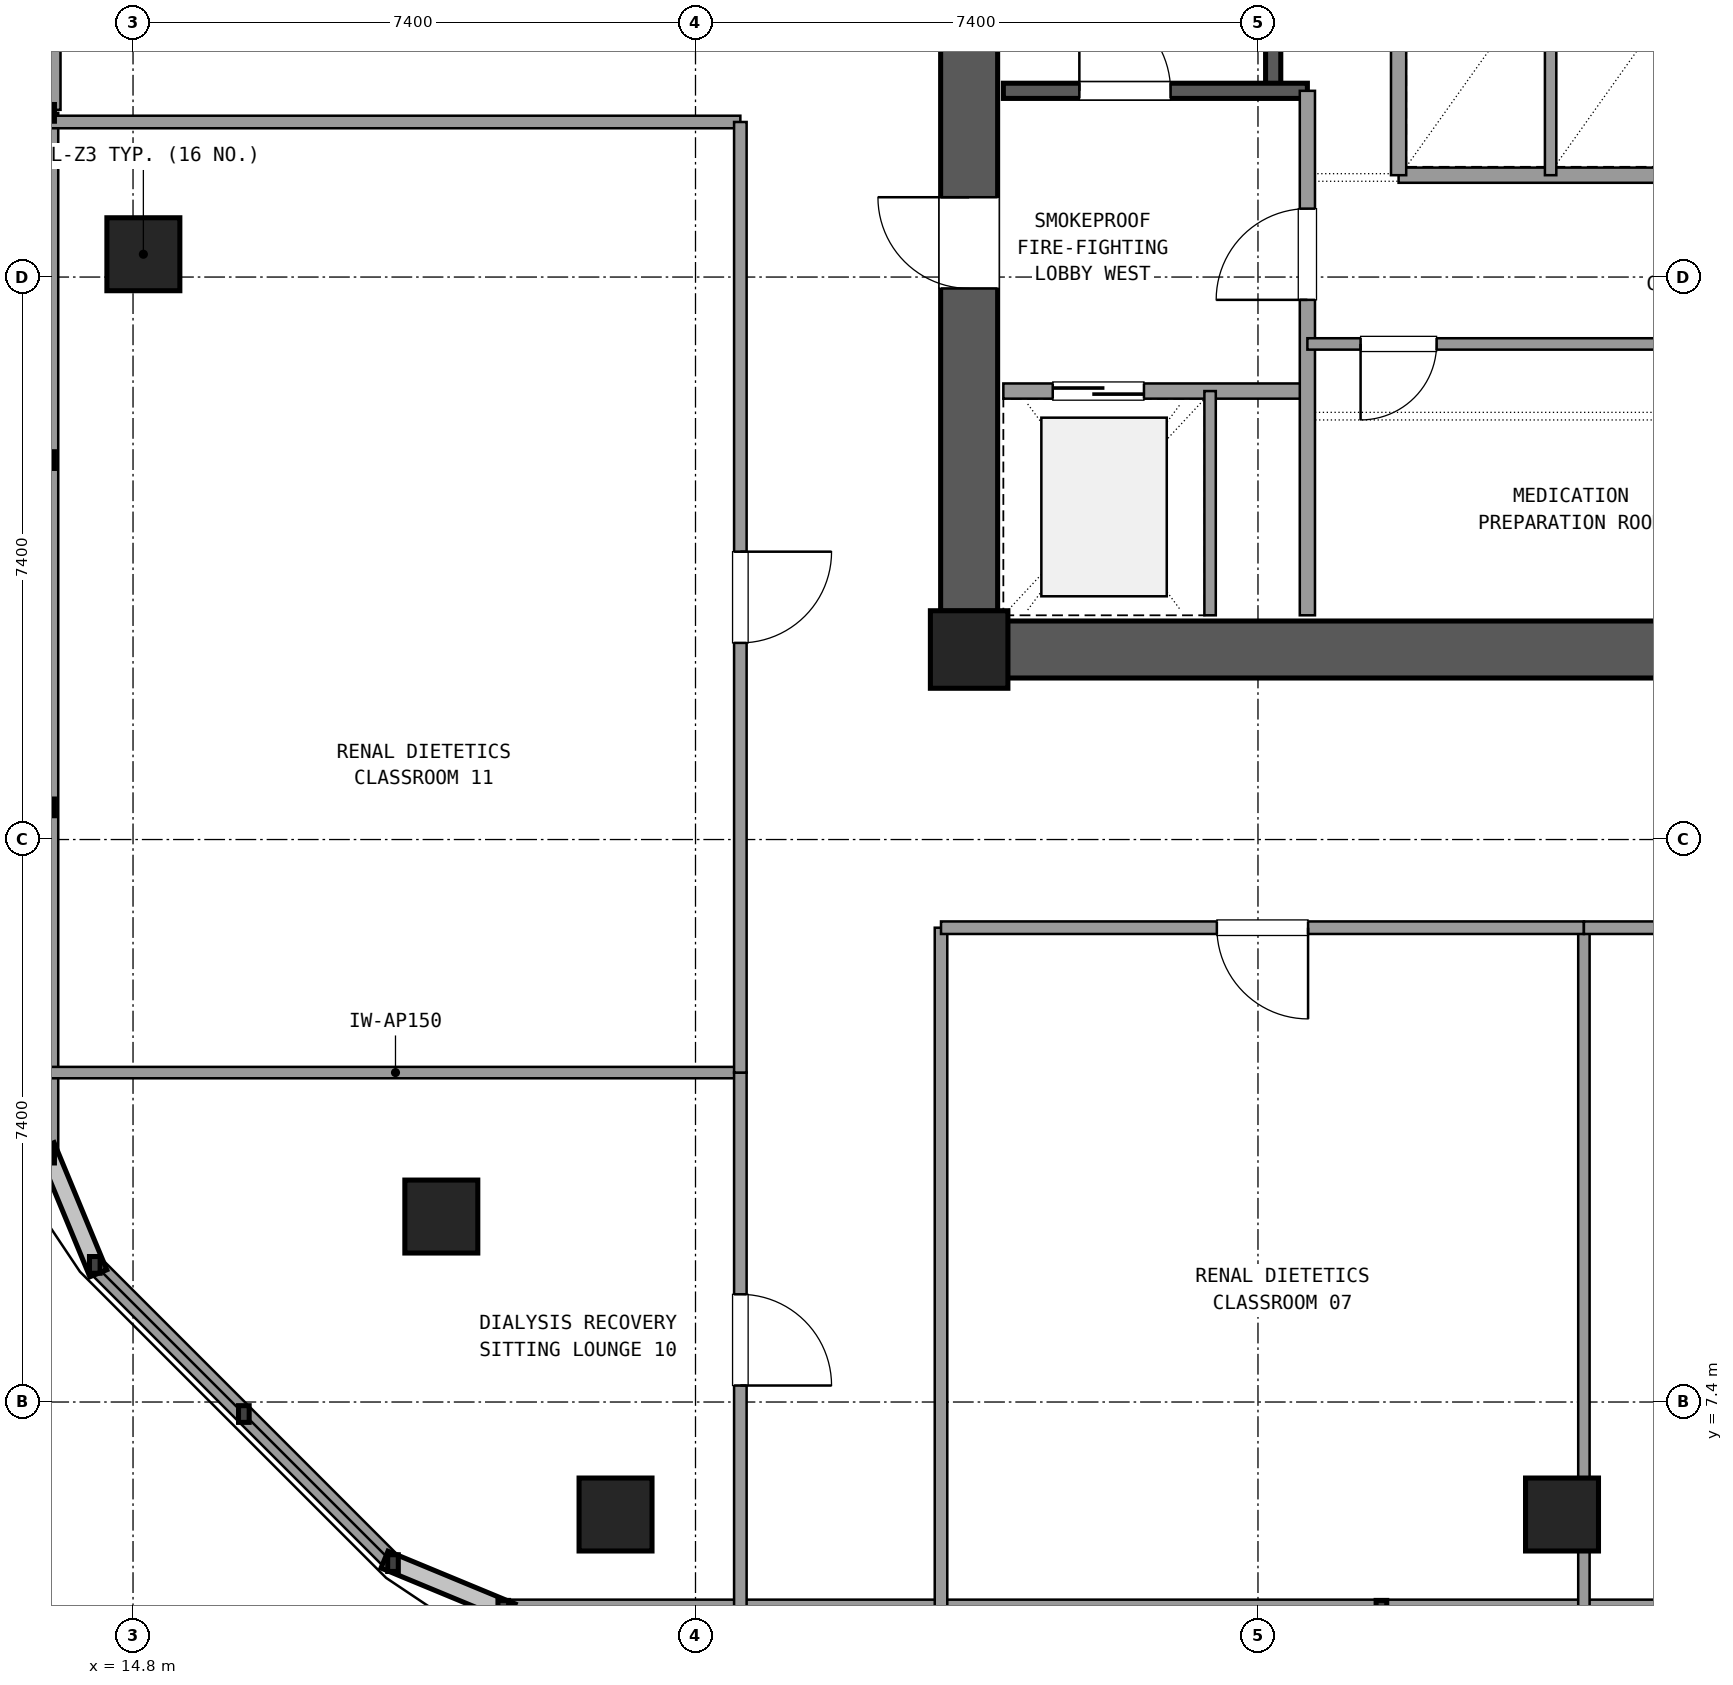
"""IFC4 building model, lengths in metres.
Left out: names, types, materials, properties, quantities, classifications, styles, units other than length and angle.
Written with IfcOpenShell. Run it as: python <this file> out.ifc"""

import sys

from ifc_helpers import new_model, si_unit, direction, frame, frame_2d, origin, origin_2d, place, context, subcontext, project, spatial, rectangle, extrude, element, fill, save


model = new_model("IFC4")
c1 = context("Model", 3, precision=1e-05, world=origin(), true_north=direction((0.0, 1.0)))
c2 = subcontext(c1, "Body", "Model", "MODEL_VIEW")
j1 = project(units=[si_unit("LENGTHUNIT", "METRE"), si_unit("PLANEANGLEUNIT", "RADIAN")], contexts=[c1])
p1 = place(None, origin())
s1 = spatial("IfcSite", under=j1, at=p1, CompositionType="ELEMENT")
p2 = place(p1, origin())
s2 = spatial("IfcBuilding", under=s1, at=p2, CompositionType="ELEMENT")
p3 = place(p2, frame((0.0, 0.0, 156.42)))
s3 = spatial("IfcBuildingStorey", under=s2, at=p3, CompositionType="ELEMENT", Elevation=156.42)
p4 = place(p3, frame((25.8, 17.3, 0.0), z_axis=(0.0, 0.0, 1.0), x_axis=(1.0, 0.0, 0.0)))
e1 = element("IfcColumn", 1, at=p4, inside=s3, PredefinedType="COLUMN", context=c2, shape_type="SweptSolid", body=[
    extrude(rectangle(XDim=1.02, YDim=1.02, at=origin_2d()), origin(), (0.0, 0.0, 1.0), 3.6),
])
p5 = place(p3, frame((26.305, 17.3, 0.0), z_axis=(0.0, 0.0, 1.0), x_axis=(1.0, 0.0, 0.0)))
e2 = element("IfcWall", 2, at=p5, inside=s3, PredefinedType="SHEAR", context=c2, shape_type="SweptSolid", body=[
    extrude(rectangle(XDim=10.19, YDim=0.75, at=frame_2d((5.095, 0.0))), origin(), (0.0, 0.0, 1.0), 3.32),
])
p6 = place(p3, frame((25.8, 25.395, 0.0), z_axis=(0.0, 0.0, 1.0), x_axis=(0.0, -1.0, 0.0)))
e3 = element("IfcWall", 3, at=p6, inside=s3, PredefinedType="SHEAR", context=c2, shape_type="SweptSolid", body=[
    extrude(rectangle(XDim=7.59, YDim=0.75, at=frame_2d((3.795, 0.0))), origin(), (0.0, 0.0, 1.0), 3.32),
])
p7 = place(p6, frame((2.145, 0.0, 0.0)))
e4 = element("IfcOpeningElement", 4, at=p7, cuts=e3, PredefinedType="OPENING", context=c2, shape_type="SweptSolid", body=[
    extrude(rectangle(XDim=1.2, YDim=2.15, at=frame_2d((0.6, 1.075))), frame((0.0, 0.385, 0.0), z_axis=(0.0, -1.0, 0.0), x_axis=(1.0, 0.0, 0.0)), (0.0, 0.0, 1.0), 0.77),
])
for number, where, z_axis, x_axis in (
    (5, (14.936, 22.5, 0.0), (0.0, 0.0, 1.0), (1.0, 0.0, 0.0)),
    (6, (18.856, 9.84, 0.0), (0.0, 0.0, 1.0), (1.0, 0.0, 0.0)),
    (7, (21.148, 5.92, 0.0), (0.0, 0.0, 1.0), (1.0, 0.0, 0.0)),
    (8, (33.6, 5.92, 0.0), (0.0, 0.0, 1.0), (1.0, 0.0, 0.0)),
):
    element("IfcColumn", number, at=place(p3, frame(where, z_axis=z_axis, x_axis=x_axis)), inside=s3, PredefinedType="COLUMN", context=c2, shape_type="SweptSolid", body=[
        extrude(rectangle(XDim=0.96, YDim=0.96, at=origin_2d()), origin(), (0.0, 0.0, 1.0), 3.6),
    ])
p8 = place(p3, frame((19.671, 4.68, 0.0), z_axis=(0.0, 0.0, 1.0), x_axis=(1.0, 0.0, 0.0)))
e9 = element("IfcWall", 9, at=p8, inside=s3, PredefinedType="SOLIDWALL", context=c2, shape_type="SweptSolid", body=[
    extrude(rectangle(XDim=34.658, YDim=0.24, at=frame_2d((17.329, 0.0))), origin(), (0.0, 0.0, 1.0), 0.85),
])
p9 = place(p3, frame((13.696, 27.4, 0.0), z_axis=(0.0, 0.0, 1.0), x_axis=(0.0, -1.0, 0.0)))
e10 = element("IfcWall", 10, at=p9, inside=s3, PredefinedType="SOLIDWALL", context=c2, shape_type="SweptSolid", body=[
    extrude(rectangle(XDim=3.0, YDim=0.3, at=frame_2d((1.5, 0.0))), origin(), (0.0, 0.0, 1.0), 2.67),
])
p10 = place(p9, frame((0.9, 0.0, 0.0)))
e11 = element("IfcOpeningElement", 11, at=p10, cuts=e10, PredefinedType="OPENING", context=c2, shape_type="SweptSolid", body=[
    extrude(rectangle(XDim=1.2, YDim=2.2, at=frame_2d((0.6, 1.1))), frame((0.0, 0.16, 0.0), z_axis=(0.0, -1.0, 0.0), x_axis=(1.0, 0.0, 0.0)), (0.0, 0.0, 1.0), 0.32),
])
p11 = place(p3, frame((13.696, 24.36, 0.0), z_axis=(0.0, 0.0, 1.0), x_axis=(0.0, -1.0, 0.0)))
e12 = element("IfcWall", 12, at=p11, inside=s3, PredefinedType="SOLIDWALL", context=c2, shape_type="SweptSolid", body=[
    extrude(rectangle(XDim=13.705, YDim=0.24, at=frame_2d((6.853, 0.0))), origin(), (0.0, 0.0, 1.0), 0.85),
])
p12 = place(p3, frame((14.297, 9.204, 0.0), z_axis=(0.0, 0.0, 1.0), x_axis=(0.707084777957, -0.707128783731, 0.0)))
e13 = element("IfcWall", 13, at=p12, inside=s3, PredefinedType="SOLIDWALL", context=c2, shape_type="SweptSolid", body=[
    extrude(rectangle(XDim=5.548, YDim=0.24, at=frame_2d((2.774, 0.0))), origin(), (0.0, 0.0, 1.0), 0.85),
])
p13 = place(p3, frame((29.8, 24.65, 0.0), z_axis=(0.0, 0.0, 1.0), x_axis=(0.0, 1.0, 0.0)))
e14 = element("IfcWall", 14, at=p13, inside=s3, PredefinedType="SHEAR", context=c2, shape_type="SweptSolid", body=[
    extrude(rectangle(XDim=9.4, YDim=0.2, at=frame_2d((4.7, 0.0))), origin(), (0.0, 0.0, 1.0), 3.32),
])
p14 = place(p3, frame((26.25, 24.65, 0.0), z_axis=(0.0, 0.0, 1.0), x_axis=(1.0, 0.0, 0.0)))
e15 = element("IfcWall", 15, at=p14, inside=s3, PredefinedType="SHEAR", context=c2, shape_type="SweptSolid", body=[
    extrude(rectangle(XDim=4.0, YDim=0.2, at=frame_2d((2.0, 0.0))), origin(), (0.0, 0.0, 1.0), 3.32),
])
p15 = place(p14, frame((1.0, 0.0, 0.0)))
e16 = element("IfcOpeningElement", 16, at=p15, cuts=e15, PredefinedType="OPENING", context=c2, shape_type="SweptSolid", body=[
    extrude(rectangle(XDim=1.2, YDim=2.15, at=frame_2d((0.6, 1.075))), frame((0.0, 0.11, 0.0), z_axis=(0.0, -1.0, 0.0), x_axis=(1.0, 0.0, 0.0)), (0.0, 0.0, 1.0), 0.22),
])
p16 = place(p3, frame((26.25, 20.7, 0.0), z_axis=(0.0, 0.0, 1.0), x_axis=(1.0, 0.0, 0.0)))
e17 = element("IfcWall", 17, at=p16, inside=s3, PredefinedType="SOLIDWALL", context=c2, shape_type="SweptSolid", body=[
    extrude(rectangle(XDim=4.0, YDim=0.2, at=frame_2d((2.0, 0.0))), origin(), (0.0, 0.0, 1.0), 2.61),
])
p17 = place(p16, frame((0.65, 0.0, 0.0)))
e18 = element("IfcOpeningElement", 18, at=p17, cuts=e17, PredefinedType="OPENING", context=c2, shape_type="SweptSolid", body=[
    extrude(rectangle(XDim=1.2, YDim=2.15, at=frame_2d((0.6, 1.075))), frame((0.0, 0.11, 0.0), z_axis=(0.0, -1.0, 0.0), x_axis=(1.0, 0.0, 0.0)), (0.0, 0.0, 1.0), 0.22),
])
p18 = place(p3, frame((30.25, 17.75, 0.0), z_axis=(0.0, 0.0, 1.0), x_axis=(0.0, 1.0, 0.0)))
e19 = element("IfcWall", 19, at=p18, inside=s3, PredefinedType="SOLIDWALL", context=c2, shape_type="SweptSolid", body=[
    extrude(rectangle(XDim=6.9, YDim=0.2, at=frame_2d((3.45, 0.0))), origin(), (0.0, 0.0, 1.0), 2.61),
])
p19 = place(p18, frame((4.15, 0.0, 0.0)))
e20 = element("IfcOpeningElement", 20, at=p19, cuts=e19, PredefinedType="OPENING", context=c2, shape_type="SweptSolid", body=[
    extrude(rectangle(XDim=1.2, YDim=2.15, at=frame_2d((0.6, 1.075))), frame((0.0, 0.11, 0.0), z_axis=(0.0, -1.0, 0.0), x_axis=(1.0, 0.0, 0.0)), (0.0, 0.0, 1.0), 0.22),
])
p20 = place(p3, frame((28.97, 17.75, 0.0), z_axis=(0.0, 0.0, 1.0), x_axis=(0.0, 1.0, 0.0)))
e21 = element("IfcWall", 21, at=p20, inside=s3, PredefinedType="PARTITIONING", context=c2, shape_type="SweptSolid", body=[
    extrude(rectangle(XDim=2.95, YDim=0.15, at=frame_2d((1.475, 0.0))), origin(), (0.0, 0.0, 1.0), 2.61),
])
p21 = place(p3, frame((30.25, 21.32, 0.0), z_axis=(0.0, 0.0, 1.0), x_axis=(1.0, 0.0, 0.0)))
e22 = element("IfcWall", 22, at=p21, inside=s3, PredefinedType="PARTITIONING", context=c2, shape_type="SweptSolid", body=[
    extrude(rectangle(XDim=7.0, YDim=0.15, at=frame_2d((3.5, 0.0))), origin(), (0.0, 0.0, 1.0), 2.61),
])
p22 = place(p21, frame((0.7, 0.0, 0.0)))
e23 = element("IfcOpeningElement", 23, at=p22, cuts=e22, PredefinedType="OPENING", context=c2, shape_type="SweptSolid", body=[
    extrude(rectangle(XDim=1.0, YDim=2.15, at=frame_2d((0.5, 1.075))), frame((0.0, 0.085, 0.0), z_axis=(0.0, -1.0, 0.0), x_axis=(1.0, 0.0, 0.0)), (0.0, 0.0, 1.0), 0.17),
])
p23 = place(p21, frame((5.5, 0.0, 0.0)))
e24 = element("IfcOpeningElement", 24, at=p23, cuts=e22, PredefinedType="OPENING", context=c2, shape_type="SweptSolid", body=[
    extrude(rectangle(XDim=1.0, YDim=2.15, at=frame_2d((0.5, 1.075))), frame((0.0, 0.085, 0.0), z_axis=(0.0, -1.0, 0.0), x_axis=(1.0, 0.0, 0.0)), (0.0, 0.0, 1.0), 0.17),
])
p24 = place(p3, frame((31.45, 23.54, 0.0), z_axis=(0.0, 0.0, 1.0), x_axis=(1.0, 0.0, 0.0)))
e25 = element("IfcWall", 25, at=p24, inside=s3, PredefinedType="SOLIDWALL", context=c2, shape_type="SweptSolid", body=[
    extrude(rectangle(XDim=5.9, YDim=0.2, at=frame_2d((2.95, 0.0))), origin(), (0.0, 0.0, 1.0), 2.61),
])
p25 = place(p3, frame((31.45, 23.54, 0.0), z_axis=(0.0, 0.0, 1.0), x_axis=(0.0, 1.0, 0.0)))
e26 = element("IfcWall", 26, at=p25, inside=s3, PredefinedType="SOLIDWALL", context=c2, shape_type="SweptSolid", body=[
    extrude(rectangle(XDim=2.81, YDim=0.2, at=frame_2d((1.405, 0.0))), origin(), (0.0, 0.0, 1.0), 2.61),
])
p26 = place(p3, frame((33.45, 23.54, 0.0), z_axis=(0.0, 0.0, 1.0), x_axis=(0.0, 1.0, 0.0)))
e27 = element("IfcWall", 27, at=p26, inside=s3, PredefinedType="PARTITIONING", context=c2, shape_type="SweptSolid", body=[
    extrude(rectangle(XDim=2.81, YDim=0.15, at=frame_2d((1.405, 0.0))), origin(), (0.0, 0.0, 1.0), 2.61),
])
p27 = place(p3, frame((25.43, 4.7, 0.0), z_axis=(0.0, 0.0, 1.0), x_axis=(0.0, 1.0, 0.0)))
e28 = element("IfcWall", 28, at=p27, inside=s3, PredefinedType="PARTITIONING", context=c2, shape_type="SweptSolid", body=[
    extrude(rectangle(XDim=8.94, YDim=0.165, at=frame_2d((4.47, 0.0))), origin(), (0.0, 0.0, 1.0), 2.61),
])
p28 = place(p3, frame((13.716, 24.24, 0.0), z_axis=(0.0, 0.0, 1.0), x_axis=(1.0, 0.0, 0.0)))
e29 = element("IfcWall", 29, at=p28, inside=s3, PredefinedType="PARTITIONING", context=c2, shape_type="SweptSolid", body=[
    extrude(rectangle(XDim=9.074, YDim=0.165, at=frame_2d((4.537, 0.0))), origin(), (0.0, 0.0, 1.0), 2.61),
])
p29 = place(p3, frame((33.888, 13.64, 0.0), z_axis=(0.0, 0.0, 1.0), x_axis=(0.0, -1.0, 0.0)))
e30 = element("IfcWall", 30, at=p29, inside=s3, PredefinedType="PARTITIONING", context=c2, shape_type="SweptSolid", body=[
    extrude(rectangle(XDim=8.94, YDim=0.15, at=frame_2d((4.47, 0.0))), origin(), (0.0, 0.0, 1.0), 2.61),
])
p30 = place(p3, frame((25.43, 13.64, 0.0), z_axis=(0.0, 0.0, 1.0), x_axis=(1.0, 0.0, 0.0)))
e31 = element("IfcWall", 31, at=p30, inside=s3, PredefinedType="PARTITIONING", context=c2, shape_type="SweptSolid", body=[
    extrude(rectangle(XDim=8.458, YDim=0.165, at=frame_2d((4.229, 0.0))), origin(), (0.0, 0.0, 1.0), 2.61),
])
p31 = place(p30, frame((3.629, 0.0, 0.0)))
e32 = element("IfcOpeningElement", 32, at=p31, cuts=e31, PredefinedType="OPENING", context=c2, shape_type="SweptSolid", body=[
    extrude(rectangle(XDim=1.2, YDim=2.15, at=frame_2d((0.6, 1.075))), frame((0.0, 0.093, 0.0), z_axis=(0.0, -1.0, 0.0), x_axis=(1.0, 0.0, 0.0)), (0.0, 0.0, 1.0), 0.185),
])
p32 = place(p3, frame((33.888, 13.64, 0.0), z_axis=(0.0, 0.0, 1.0), x_axis=(1.0, 0.0, 0.0)))
e33 = element("IfcWall", 33, at=p32, inside=s3, PredefinedType="PARTITIONING", context=c2, shape_type="SweptSolid", body=[
    extrude(rectangle(XDim=6.118, YDim=0.165, at=frame_2d((3.059, 0.0))), origin(), (0.0, 0.0, 1.0), 2.61),
])
p33 = place(p32, frame((1.664, 0.0, 0.0)))
e34 = element("IfcOpeningElement", 34, at=p33, cuts=e33, PredefinedType="OPENING", context=c2, shape_type="SweptSolid", body=[
    extrude(rectangle(XDim=1.2, YDim=2.15, at=frame_2d((0.6, 1.075))), frame((0.0, 0.093, 0.0), z_axis=(0.0, -1.0, 0.0), x_axis=(1.0, 0.0, 0.0)), (0.0, 0.0, 1.0), 0.185),
])
p34 = place(p3, frame((22.79, 11.734, 0.0), z_axis=(0.0, 0.0, 1.0), x_axis=(-1.0, 0.0, 0.0)))
e35 = element("IfcWall", 35, at=p34, inside=s3, PredefinedType="PARTITIONING", context=c2, shape_type="SweptSolid", body=[
    extrude(rectangle(XDim=9.074, YDim=0.15, at=frame_2d((4.537, 0.0))), origin(), (0.0, 0.0, 1.0), 2.61),
])
p35 = place(p3, frame((22.79, 4.7, 0.0), z_axis=(0.0, 0.0, 1.0), x_axis=(0.0, 1.0, 0.0)))
e36 = element("IfcWall", 36, at=p35, inside=s3, PredefinedType="PARTITIONING", context=c2, shape_type="SweptSolid", body=[
    extrude(rectangle(XDim=7.034, YDim=0.165, at=frame_2d((3.517, 0.0))), origin(), (0.0, 0.0, 1.0), 2.61),
])
p36 = place(p35, frame((2.917, 0.0, 0.0)))
e37 = element("IfcOpeningElement", 37, at=p36, cuts=e36, PredefinedType="OPENING", context=c2, shape_type="SweptSolid", body=[
    extrude(rectangle(XDim=1.2, YDim=2.15, at=frame_2d((0.6, 1.075))), frame((0.0, 0.093, 0.0), z_axis=(0.0, -1.0, 0.0), x_axis=(1.0, 0.0, 0.0)), (0.0, 0.0, 1.0), 0.185),
])
p37 = place(p3, frame((22.79, 11.734, 0.0), z_axis=(0.0, 0.0, 1.0), x_axis=(0.0, 1.0, 0.0)))
e38 = element("IfcWall", 38, at=p37, inside=s3, PredefinedType="PARTITIONING", context=c2, shape_type="SweptSolid", body=[
    extrude(rectangle(XDim=12.506, YDim=0.165, at=frame_2d((6.253, 0.0))), origin(), (0.0, 0.0, 1.0), 2.61),
])
p38 = place(p37, frame((5.653, 0.0, 0.0)))
e39 = element("IfcOpeningElement", 39, at=p38, cuts=e38, PredefinedType="OPENING", context=c2, shape_type="SweptSolid", body=[
    extrude(rectangle(XDim=1.2, YDim=2.15, at=frame_2d((0.6, 1.075))), frame((0.0, 0.093, 0.0), z_axis=(0.0, -1.0, 0.0), x_axis=(1.0, 0.0, 0.0)), (0.0, 0.0, 1.0), 0.185),
])
p39 = place(p15, origin())
e40 = element("IfcDoor", 40, at=p39, inside=s3, OperationType="SINGLE_SWING_LEFT", PredefinedType="DOOR", context=c2, shape_type="SweptSolid", body=[
    extrude(rectangle(XDim=1.2, YDim=2.15, at=frame_2d((0.6, 1.075))), frame((0.0, 0.025, 0.0), z_axis=(0.0, -1.0, 0.0), x_axis=(1.0, 0.0, 0.0)), (0.0, 0.0, 1.0), 0.05),
])
fill(e16, e40)
p40 = place(p17, origin())
e41 = element("IfcDoor", 41, at=p40, inside=s3, OperationType="SLIDING_TO_LEFT", PredefinedType="DOOR", context=c2, shape_type="SweptSolid", body=[
    extrude(rectangle(XDim=1.2, YDim=2.15, at=frame_2d((0.6, 1.075))), frame((0.0, 0.025, 0.0), z_axis=(0.0, -1.0, 0.0), x_axis=(1.0, 0.0, 0.0)), (0.0, 0.0, 1.0), 0.05),
])
fill(e18, e41)
p41 = place(p19, origin())
e42 = element("IfcDoor", 42, at=p41, inside=s3, OperationType="SINGLE_SWING_LEFT", PredefinedType="DOOR", context=c2, shape_type="SweptSolid", body=[
    extrude(rectangle(XDim=1.2, YDim=2.15, at=frame_2d((0.6, 1.075))), frame((0.0, 0.025, 0.0), z_axis=(0.0, -1.0, 0.0), x_axis=(1.0, 0.0, 0.0)), (0.0, 0.0, 1.0), 0.05),
])
fill(e20, e42)
p42 = place(p7, frame((1.2, 0.0, 0.0), z_axis=(0.0, 0.0, 1.0), x_axis=(-1.0, 0.0, 0.0)))
e43 = element("IfcDoor", 43, at=p42, inside=s3, OperationType="SINGLE_SWING_LEFT", PredefinedType="DOOR", context=c2, shape_type="SweptSolid", body=[
    extrude(rectangle(XDim=1.2, YDim=2.15, at=frame_2d((0.6, 1.075))), frame((0.0, 0.025, 0.0), z_axis=(0.0, -1.0, 0.0), x_axis=(1.0, 0.0, 0.0)), (0.0, 0.0, 1.0), 0.05),
])
fill(e4, e43)
p43 = place(p22, frame((1.0, 0.0, 0.0), z_axis=(0.0, 0.0, 1.0), x_axis=(-1.0, 0.0, 0.0)))
e44 = element("IfcDoor", 44, at=p43, inside=s3, OperationType="SINGLE_SWING_LEFT", PredefinedType="DOOR", context=c2, shape_type="SweptSolid", body=[
    extrude(rectangle(XDim=1.0, YDim=2.15, at=frame_2d((0.5, 1.075))), frame((0.0, 0.025, 0.0), z_axis=(0.0, -1.0, 0.0), x_axis=(1.0, 0.0, 0.0)), (0.0, 0.0, 1.0), 0.05),
])
fill(e23, e44)
p44 = place(p31, frame((1.2, 0.0, 0.0), z_axis=(0.0, 0.0, 1.0), x_axis=(-1.0, 0.0, 0.0)))
e45 = element("IfcDoor", 45, at=p44, inside=s3, OperationType="SINGLE_SWING_RIGHT", PredefinedType="DOOR", context=c2, shape_type="SweptSolid", body=[
    extrude(rectangle(XDim=1.2, YDim=2.15, at=frame_2d((0.6, 1.075))), frame((0.0, 0.025, 0.0), z_axis=(0.0, -1.0, 0.0), x_axis=(1.0, 0.0, 0.0)), (0.0, 0.0, 1.0), 0.05),
])
fill(e32, e45)
p45 = place(p36, frame((1.2, 0.0, 0.0), z_axis=(0.0, 0.0, 1.0), x_axis=(-1.0, 0.0, 0.0)))
e46 = element("IfcDoor", 46, at=p45, inside=s3, OperationType="SINGLE_SWING_LEFT", PredefinedType="DOOR", context=c2, shape_type="SweptSolid", body=[
    extrude(rectangle(XDim=1.2, YDim=2.15, at=frame_2d((0.6, 1.075))), frame((0.0, 0.025, 0.0), z_axis=(0.0, -1.0, 0.0), x_axis=(1.0, 0.0, 0.0)), (0.0, 0.0, 1.0), 0.05),
])
fill(e37, e46)
p46 = place(p38, frame((1.2, 0.0, 0.0), z_axis=(0.0, 0.0, 1.0), x_axis=(-1.0, 0.0, 0.0)))
e47 = element("IfcDoor", 47, at=p46, inside=s3, OperationType="SINGLE_SWING_RIGHT", PredefinedType="DOOR", context=c2, shape_type="SweptSolid", body=[
    extrude(rectangle(XDim=1.2, YDim=2.15, at=frame_2d((0.6, 1.075))), frame((0.0, 0.025, 0.0), z_axis=(0.0, -1.0, 0.0), x_axis=(1.0, 0.0, 0.0)), (0.0, 0.0, 1.0), 0.05),
])
fill(e39, e47)
save(model, sys.argv[1])
